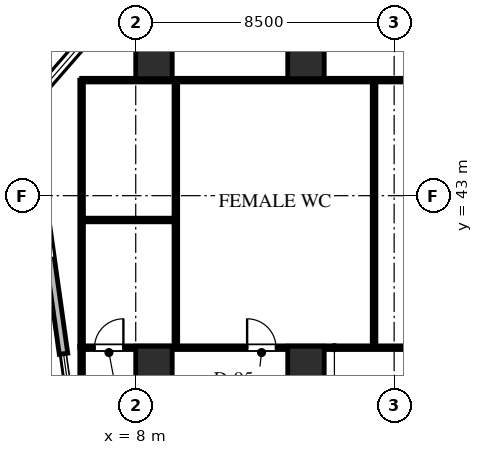
"""IFC4 building model, lengths in metres.
Left out: names, types, materials, properties, quantities, classifications, styles, units other than length and angle.
Written with IfcOpenShell. Run it as: python <this file> out.ifc"""

import sys

from ifc_helpers import new_model, si_unit, direction, frame, frame_2d, origin, origin_2d, place, context, subcontext, project, spatial, rectangle, extrude, element, fill, save


model = new_model("IFC4")
c1 = context("Model", 3, precision=1e-05, world=origin(), true_north=direction((0.0, 1.0)))
c2 = subcontext(c1, "Body", "Model", "MODEL_VIEW")
j1 = project(units=[si_unit("LENGTHUNIT", "METRE"), si_unit("PLANEANGLEUNIT", "RADIAN")], contexts=[c1])
p1 = place(None, origin())
s1 = spatial("IfcSite", under=j1, at=p1, CompositionType="ELEMENT")
p2 = place(p1, origin())
s2 = spatial("IfcBuilding", under=s1, at=p2, CompositionType="ELEMENT")
p3 = place(p2, frame((0.0, 0.0, 53.5)))
s3 = spatial("IfcBuildingStorey", under=s2, at=p3, CompositionType="ELEMENT", Elevation=53.5)
for number, where, z_axis, x_axis in (
    (1, (13.6, 37.35, 0.0), (0.0, 0.0, 1.0), (1.0, 0.0, 0.0)),
    (2, (13.6, 47.55, 0.0), (0.0, 0.0, 1.0), (1.0, 0.0, 0.0)),
    (3, (8.6, 37.35, 0.0), (0.0, 0.0, 1.0), (1.0, 0.0, 0.0)),
    (4, (8.6, 47.55, 0.0), (0.0, 0.0, 1.0), (1.0, 0.0, 0.0)),
):
    element("IfcColumn", number, at=place(p3, frame(where, z_axis=z_axis, x_axis=x_axis)), inside=s3, PredefinedType="COLUMN", context=c2, shape_type="SweptSolid", body=[
        extrude(rectangle(XDim=1.2, YDim=1.4, at=origin_2d()), origin(), (0.0, 0.0, 1.0), 4.0),
    ])
p4 = place(p3, frame((5.625, 37.8, 0.0), z_axis=(0.0, 0.0, 1.0), x_axis=(-0.139180172484, 0.990267074878, 0.0)))
e5 = element("IfcWall", 5, at=p4, inside=s3, PredefinedType="STANDARD", context=c2, shape_type="SweptSolid", body=[
    extrude(rectangle(XDim=8.267, YDim=0.28, at=frame_2d((4.134, 0.0))), origin(), (0.0, 0.0, 1.0), 3.74),
])
p5 = place(p4, frame((3.173, 0.0, 0.65)))
e6 = element("IfcOpeningElement", 6, at=p5, cuts=e5, PredefinedType="OPENING", context=c2, shape_type="SweptSolid", body=[
    extrude(rectangle(XDim=1.8, YDim=2.1, at=frame_2d((0.9, 1.05))), frame((0.0, 0.15, 0.0), z_axis=(0.0, -1.0, 0.0), x_axis=(1.0, 0.0, 0.0)), (0.0, 0.0, 1.0), 0.3),
])
p6 = place(p3, frame((4.474, 45.987, 0.0), z_axis=(0.0, 0.0, 1.0), x_axis=(0.656070053895, 0.754699996278, 0.0)))
e7 = element("IfcWall", 7, at=p6, inside=s3, PredefinedType="STANDARD", context=c2, shape_type="SweptSolid", body=[
    extrude(rectangle(XDim=3.171, YDim=0.28, at=frame_2d((1.585, 0.0))), origin(), (0.0, 0.0, 1.0), 3.74),
])
p7 = place(p6, frame((0.667, 0.0, 0.65)))
e8 = element("IfcOpeningElement", 8, at=p7, cuts=e7, PredefinedType="OPENING", context=c2, shape_type="SweptSolid", body=[
    extrude(rectangle(XDim=1.8, YDim=2.1, at=frame_2d((0.9, 1.05))), frame((0.0, 0.15, 0.0), z_axis=(0.0, -1.0, 0.0), x_axis=(1.0, 0.0, 0.0)), (0.0, 0.0, 1.0), 0.3),
])
p8 = place(p3, frame((6.22, 38.0, 0.0), z_axis=(0.0, 0.0, 1.0), x_axis=(1.0, 0.0, 0.0)))
e9 = element("IfcWall", 9, at=p8, inside=s3, PredefinedType="PARTITIONING", context=c2, shape_type="SweptSolid", body=[
    extrude(rectangle(XDim=16.63, YDim=0.12, at=frame_2d((8.315, 0.0))), origin(), (0.0, 0.0, 1.0), 2.813),
])
p9 = place(p8, frame((0.424, 0.0, 0.0)))
e10 = element("IfcOpeningElement", 10, at=p9, cuts=e9, PredefinedType="OPENING", context=c2, shape_type="SweptSolid", body=[
    extrude(rectangle(XDim=0.95, YDim=2.15, at=frame_2d((0.475, 1.075))), frame((0.0, 0.07, 0.0), z_axis=(0.0, -1.0, 0.0), x_axis=(1.0, 0.0, 0.0)), (0.0, 0.0, 1.0), 0.14),
])
p10 = place(p8, frame((5.444, 0.0, 0.0)))
e11 = element("IfcOpeningElement", 11, at=p10, cuts=e9, PredefinedType="OPENING", context=c2, shape_type="SweptSolid", body=[
    extrude(rectangle(XDim=0.95, YDim=2.15, at=frame_2d((0.475, 1.075))), frame((0.0, 0.07, 0.0), z_axis=(0.0, -1.0, 0.0), x_axis=(1.0, 0.0, 0.0)), (0.0, 0.0, 1.0), 0.14),
])
p11 = place(p8, frame((13.344, 0.0, 0.0)))
e12 = element("IfcOpeningElement", 12, at=p11, cuts=e9, PredefinedType="OPENING", context=c2, shape_type="SweptSolid", body=[
    extrude(rectangle(XDim=0.95, YDim=2.15, at=frame_2d((0.475, 1.075))), frame((0.0, 0.07, 0.0), z_axis=(0.0, -1.0, 0.0), x_axis=(1.0, 0.0, 0.0)), (0.0, 0.0, 1.0), 0.14),
])
p12 = place(p3, frame((6.22, 38.0, 0.0), z_axis=(0.0, 0.0, 1.0), x_axis=(0.0, 1.0, 0.0)))
e13 = element("IfcWall", 13, at=p12, inside=s3, PredefinedType="PARTITIONING", context=c2, shape_type="SweptSolid", body=[
    extrude(rectangle(XDim=8.8, YDim=0.12, at=frame_2d((4.4, 0.0))), origin(), (0.0, 0.0, 1.0), 3.74),
])
p13 = place(p3, frame((6.22, 46.8, 0.0), z_axis=(0.0, 0.0, 1.0), x_axis=(1.0, 0.0, 0.0)))
e14 = element("IfcWall", 14, at=p13, inside=s3, PredefinedType="PARTITIONING", context=c2, shape_type="SweptSolid", body=[
    extrude(rectangle(XDim=16.68, YDim=0.12, at=frame_2d((8.34, 0.0))), origin(), (0.0, 0.0, 1.0), 2.813),
])
for number, where, z_axis, x_axis in (
    (15, (9.32, 38.068, 0.0), (0.0, 0.0, 1.0), (0.0, 1.0, 0.0)),
    (16, (15.84, 38.068, 0.0), (0.0, 0.0, 1.0), (0.0, 1.0, 0.0)),
):
    element("IfcWall", number, at=place(p3, frame(where, z_axis=z_axis, x_axis=x_axis)), inside=s3, PredefinedType="PARTITIONING", context=c2, shape_type="SweptSolid", body=[
        extrude(rectangle(XDim=8.664, YDim=0.12, at=frame_2d((4.332, 0.0))), origin(), (0.0, 0.0, 1.0), 3.74),
    ])
p14 = place(p3, frame((6.288, 42.2, 0.0), z_axis=(0.0, 0.0, 1.0), x_axis=(1.0, 0.0, 0.0)))
e17 = element("IfcWall", 17, at=p14, inside=s3, PredefinedType="PARTITIONING", context=c2, shape_type="SweptSolid", body=[
    extrude(rectangle(XDim=2.964, YDim=0.12, at=frame_2d((1.482, 0.0))), origin(), (0.0, 0.0, 1.0), 2.813),
])
p15 = place(p3, frame((6.22, 34.4, 0.0), z_axis=(0.0, 0.0, 1.0), x_axis=(0.0, 1.0, 0.0)))
e18 = element("IfcWall", 18, at=p15, inside=s3, PredefinedType="PARTITIONING", context=c2, shape_type="SweptSolid", body=[
    extrude(rectangle(XDim=3.65, YDim=0.12, at=frame_2d((1.825, 0.0))), origin(), (0.0, 0.0, 1.0), 3.74),
])
p16 = place(p7, origin())
e19 = element("IfcWindow", 19, at=p16, inside=s3, PartitioningType="SINGLE_PANEL", PredefinedType="WINDOW", context=c2, shape_type="SweptSolid", body=[
    extrude(rectangle(XDim=1.8, YDim=2.1, at=frame_2d((0.9, 1.05))), frame((0.0, 0.03, 0.0), z_axis=(0.0, -1.0, 0.0), x_axis=(1.0, 0.0, 0.0)), (0.0, 0.0, 1.0), 0.06),
])
fill(e8, e19)
p17 = place(p9, origin())
e20 = element("IfcDoor", 20, at=p17, inside=s3, OperationType="SINGLE_SWING_RIGHT", PredefinedType="DOOR", context=c2, shape_type="SweptSolid", body=[
    extrude(rectangle(XDim=0.95, YDim=2.15, at=frame_2d((0.475, 1.075))), frame((0.0, 0.025, 0.0), z_axis=(0.0, -1.0, 0.0), x_axis=(1.0, 0.0, 0.0)), (0.0, 0.0, 1.0), 0.05),
])
fill(e10, e20)
p18 = place(p10, origin())
e21 = element("IfcDoor", 21, at=p18, inside=s3, OperationType="SINGLE_SWING_LEFT", PredefinedType="DOOR", context=c2, shape_type="SweptSolid", body=[
    extrude(rectangle(XDim=0.95, YDim=2.15, at=frame_2d((0.475, 1.075))), frame((0.0, 0.025, 0.0), z_axis=(0.0, -1.0, 0.0), x_axis=(1.0, 0.0, 0.0)), (0.0, 0.0, 1.0), 0.05),
])
fill(e11, e21)
save(model, sys.argv[1])
